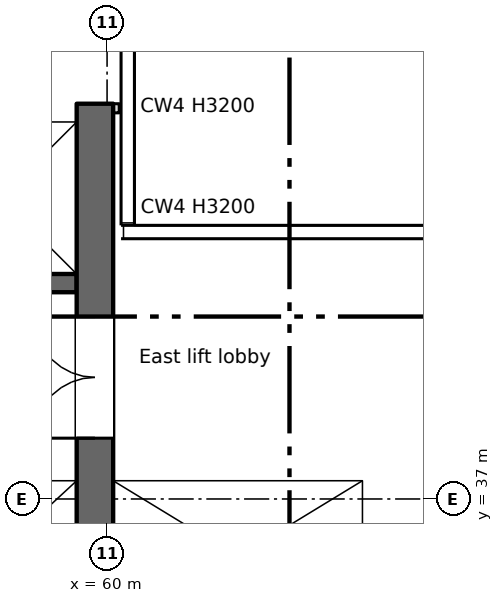
"""IFC4 building model, lengths in metres.
Left out: names, types, materials, properties, quantities, classifications, styles, units other than length and angle.
Written with IfcOpenShell. Run it as: python <this file> out.ifc"""

import sys

from ifc_helpers import new_model, si_unit, direction, frame, frame_2d, origin, place, context, subcontext, project, spatial, rectangle, extrude, element, fill, save


model = new_model("IFC4")
c1 = context("Model", 3, precision=1e-05, world=origin(), true_north=direction((0.0, 1.0)))
c2 = subcontext(c1, "Body", "Model", "MODEL_VIEW")
j1 = project(units=[si_unit("LENGTHUNIT", "METRE"), si_unit("PLANEANGLEUNIT", "RADIAN")], contexts=[c1])
p1 = place(None, origin())
s1 = spatial("IfcSite", under=j1, at=p1, CompositionType="ELEMENT")
p2 = place(p1, origin())
s2 = spatial("IfcBuilding", under=s1, at=p2, CompositionType="ELEMENT")
p3 = place(p2, frame((0.0, 0.0, 262.15)))
s3 = spatial("IfcBuildingStorey", under=s2, at=p3, CompositionType="ELEMENT", Elevation=262.15)
p4 = place(p3, frame((64.35, 34.8, 0.0), z_axis=(0.0, 0.0, 1.0), x_axis=(0.0, 1.0, 0.0)))
e1 = element("IfcWall", 1, at=p4, inside=s3, PredefinedType="SHEAR", context=c2, shape_type="SweptSolid", body=[
    extrude(rectangle(XDim=6.45, YDim=0.3, at=frame_2d((3.225, 0.0))), origin(), (0.0, 0.0, 1.0), 3.2),
])
p5 = place(p3, frame((59.8, 28.4, 0.0), z_axis=(0.0, 0.0, 1.0), x_axis=(0.0, 1.0, 0.0)))
e2 = element("IfcWall", 2, at=p5, inside=s3, PredefinedType="SHEAR", context=c2, shape_type="SweptSolid", body=[
    extrude(rectangle(XDim=15.1, YDim=0.6, at=frame_2d((7.55, 0.0))), origin(), (0.0, 0.0, 1.0), 3.2),
])
p6 = place(p5, frame((9.6, 0.0, 0.0)))
e3 = element("IfcOpeningElement", 3, at=p6, cuts=e2, PredefinedType="OPENING", context=c2, shape_type="SweptSolid", body=[
    extrude(rectangle(XDim=2.0, YDim=2.1, at=frame_2d((1.0, 1.05))), frame((0.0, 0.31, 0.0), z_axis=(0.0, -1.0, 0.0), x_axis=(1.0, 0.0, 0.0)), (0.0, 0.0, 1.0), 0.62),
])
p7 = place(p3, frame((47.3, 37.45, 0.0), z_axis=(0.0, 0.0, 1.0), x_axis=(1.0, 0.0, 0.0)))
e4 = element("IfcWall", 4, at=p7, inside=s3, PredefinedType="SHEAR", context=c2, shape_type="SweptSolid", body=[
    extrude(rectangle(XDim=12.2, YDim=0.3, at=frame_2d((6.1, 0.0))), origin(), (0.0, 0.0, 1.0), 3.2),
])
p8 = place(p7, frame((4.3, 0.0, 0.0)))
e5 = element("IfcOpeningElement", 5, at=p8, cuts=e4, PredefinedType="OPENING", context=c2, shape_type="SweptSolid", body=[
    extrude(rectangle(XDim=1.1, YDim=2.1, at=frame_2d((0.55, 1.05))), frame((0.0, 0.16, 0.0), z_axis=(0.0, -1.0, 0.0), x_axis=(1.0, 0.0, 0.0)), (0.0, 0.0, 1.0), 0.32),
])
p9 = place(p7, frame((7.3, 0.0, 0.0)))
e6 = element("IfcOpeningElement", 6, at=p9, cuts=e4, PredefinedType="OPENING", context=c2, shape_type="SweptSolid", body=[
    extrude(rectangle(XDim=1.1, YDim=2.1, at=frame_2d((0.55, 1.05))), frame((0.0, 0.16, 0.0), z_axis=(0.0, -1.0, 0.0), x_axis=(1.0, 0.0, 0.0)), (0.0, 0.0, 1.0), 0.32),
])
p10 = place(p7, frame((10.3, 0.0, 0.0)))
e7 = element("IfcOpeningElement", 7, at=p10, cuts=e4, PredefinedType="OPENING", context=c2, shape_type="SweptSolid", body=[
    extrude(rectangle(XDim=1.1, YDim=2.1, at=frame_2d((0.55, 1.05))), frame((0.0, 0.16, 0.0), z_axis=(0.0, -1.0, 0.0), x_axis=(1.0, 0.0, 0.0)), (0.0, 0.0, 1.0), 0.32),
])
p11 = place(p3, frame((60.1, 37.45, 0.0), z_axis=(0.0, 0.0, 1.0), x_axis=(1.0, 0.0, 0.0)))
e8 = element("IfcWall", 8, at=p11, inside=s3, PredefinedType="SHEAR", context=c2, shape_type="SweptSolid", body=[
    extrude(rectangle(XDim=4.1, YDim=0.3, at=frame_2d((2.05, 0.0))), origin(), (0.0, 0.0, 1.0), 3.2),
])
p12 = place(p11, frame((1.5, 0.0, 0.0)))
e9 = element("IfcOpeningElement", 9, at=p12, cuts=e8, PredefinedType="OPENING", context=c2, shape_type="SweptSolid", body=[
    extrude(rectangle(XDim=1.1, YDim=2.1, at=frame_2d((0.55, 1.05))), frame((0.0, 0.16, 0.0), z_axis=(0.0, -1.0, 0.0), x_axis=(1.0, 0.0, 0.0)), (0.0, 0.0, 1.0), 0.32),
])
p13 = place(p3, frame((18.5, 40.55, 0.0), z_axis=(0.0, 0.0, 1.0), x_axis=(1.0, 0.0, 0.0)))
e10 = element("IfcWall", 10, at=p13, inside=s3, PredefinedType="SHEAR", context=c2, shape_type="SweptSolid", body=[
    extrude(rectangle(XDim=41.0, YDim=0.3, at=frame_2d((20.5, 0.0))), origin(), (0.0, 0.0, 1.0), 3.2),
])
p14 = place(p13, frame((2.15, 0.0, 0.0)))
e11 = element("IfcOpeningElement", 11, at=p14, cuts=e10, PredefinedType="OPENING", context=c2, shape_type="SweptSolid", body=[
    extrude(rectangle(XDim=0.9, YDim=2.1, at=frame_2d((0.45, 1.05))), frame((0.0, 0.16, 0.0), z_axis=(0.0, -1.0, 0.0), x_axis=(1.0, 0.0, 0.0)), (0.0, 0.0, 1.0), 0.32),
])
p15 = place(p13, frame((15.9, 0.0, 0.0)))
e12 = element("IfcOpeningElement", 12, at=p15, cuts=e10, PredefinedType="OPENING", context=c2, shape_type="SweptSolid", body=[
    extrude(rectangle(XDim=0.9, YDim=2.1, at=frame_2d((0.45, 1.05))), frame((0.0, 0.16, 0.0), z_axis=(0.0, -1.0, 0.0), x_axis=(1.0, 0.0, 0.0)), (0.0, 0.0, 1.0), 0.32),
])
p16 = place(p13, frame((21.4, 0.0, 0.0)))
e13 = element("IfcOpeningElement", 13, at=p16, cuts=e10, PredefinedType="OPENING", context=c2, shape_type="SweptSolid", body=[
    extrude(rectangle(XDim=0.9, YDim=2.1, at=frame_2d((0.45, 1.05))), frame((0.0, 0.16, 0.0), z_axis=(0.0, -1.0, 0.0), x_axis=(1.0, 0.0, 0.0)), (0.0, 0.0, 1.0), 0.32),
])
p17 = place(p13, frame((26.9, 0.0, 0.0)))
e14 = element("IfcOpeningElement", 14, at=p17, cuts=e10, PredefinedType="OPENING", context=c2, shape_type="SweptSolid", body=[
    extrude(rectangle(XDim=0.9, YDim=2.1, at=frame_2d((0.45, 1.05))), frame((0.0, 0.16, 0.0), z_axis=(0.0, -1.0, 0.0), x_axis=(1.0, 0.0, 0.0)), (0.0, 0.0, 1.0), 0.32),
])
p18 = place(p13, frame((6.175, 0.0, 0.0)))
e15 = element("IfcOpeningElement", 15, at=p18, cuts=e10, PredefinedType="OPENING", context=c2, shape_type="SweptSolid", body=[
    extrude(rectangle(XDim=1.1, YDim=2.1, at=frame_2d((0.55, 1.05))), frame((0.0, 0.16, 0.0), z_axis=(0.0, -1.0, 0.0), x_axis=(1.0, 0.0, 0.0)), (0.0, 0.0, 1.0), 0.32),
])
p19 = place(p13, frame((8.925, 0.0, 0.0)))
e16 = element("IfcOpeningElement", 16, at=p19, cuts=e10, PredefinedType="OPENING", context=c2, shape_type="SweptSolid", body=[
    extrude(rectangle(XDim=1.1, YDim=2.1, at=frame_2d((0.55, 1.05))), frame((0.0, 0.16, 0.0), z_axis=(0.0, -1.0, 0.0), x_axis=(1.0, 0.0, 0.0)), (0.0, 0.0, 1.0), 0.32),
])
p20 = place(p13, frame((11.675, 0.0, 0.0)))
e17 = element("IfcOpeningElement", 17, at=p20, cuts=e10, PredefinedType="OPENING", context=c2, shape_type="SweptSolid", body=[
    extrude(rectangle(XDim=1.1, YDim=2.1, at=frame_2d((0.55, 1.05))), frame((0.0, 0.16, 0.0), z_axis=(0.0, -1.0, 0.0), x_axis=(1.0, 0.0, 0.0)), (0.0, 0.0, 1.0), 0.32),
])
p21 = place(p13, frame((30.925, 0.0, 0.0)))
e18 = element("IfcOpeningElement", 18, at=p21, cuts=e10, PredefinedType="OPENING", context=c2, shape_type="SweptSolid", body=[
    extrude(rectangle(XDim=1.1, YDim=2.1, at=frame_2d((0.55, 1.05))), frame((0.0, 0.16, 0.0), z_axis=(0.0, -1.0, 0.0), x_axis=(1.0, 0.0, 0.0)), (0.0, 0.0, 1.0), 0.32),
])
p22 = place(p13, frame((33.675, 0.0, 0.0)))
e19 = element("IfcOpeningElement", 19, at=p22, cuts=e10, PredefinedType="OPENING", context=c2, shape_type="SweptSolid", body=[
    extrude(rectangle(XDim=1.1, YDim=2.1, at=frame_2d((0.55, 1.05))), frame((0.0, 0.16, 0.0), z_axis=(0.0, -1.0, 0.0), x_axis=(1.0, 0.0, 0.0)), (0.0, 0.0, 1.0), 0.32),
])
p23 = place(p13, frame((36.375, 0.0, 0.0)))
e20 = element("IfcOpeningElement", 20, at=p23, cuts=e10, PredefinedType="OPENING", context=c2, shape_type="SweptSolid", body=[
    extrude(rectangle(XDim=1.2, YDim=2.1, at=frame_2d((0.6, 1.05))), frame((0.0, 0.16, 0.0), z_axis=(0.0, -1.0, 0.0), x_axis=(1.0, 0.0, 0.0)), (0.0, 0.0, 1.0), 0.32),
])
p24 = place(p13, frame((39.15, 0.0, 0.0)))
e21 = element("IfcOpeningElement", 21, at=p24, cuts=e10, PredefinedType="OPENING", context=c2, shape_type="SweptSolid", body=[
    extrude(rectangle(XDim=1.2, YDim=2.1, at=frame_2d((0.6, 1.05))), frame((0.0, 0.16, 0.0), z_axis=(0.0, -1.0, 0.0), x_axis=(1.0, 0.0, 0.0)), (0.0, 0.0, 1.0), 0.32),
])
p25 = place(p3, frame((18.5, 43.35, 0.0), z_axis=(0.0, 0.0, 1.0), x_axis=(1.0, 0.0, 0.0)))
e22 = element("IfcWall", 22, at=p25, inside=s3, PredefinedType="SHEAR", context=c2, shape_type="SweptSolid", body=[
    extrude(rectangle(XDim=41.0, YDim=0.3, at=frame_2d((20.5, 0.0))), origin(), (0.0, 0.0, 1.0), 3.2),
])
p26 = place(p3, frame((60.15, 43.35, 0.0), z_axis=(0.0, 0.0, 1.0), x_axis=(0.0, 1.0, 0.0)))
e23 = element("IfcWall", 23, at=p26, inside=s3, PredefinedType="PARTITIONING", context=c2, shape_type="SweptSolid", body=[
    extrude(rectangle(XDim=0.15, YDim=0.1, at=frame_2d((0.075, 0.0))), origin(), (0.0, 0.0, 1.0), 3.2),
])
p27 = place(p12, origin())
e24 = element("IfcDoor", 24, at=p27, inside=s3, OperationType="SLIDING_TO_LEFT", PredefinedType="DOOR", context=c2, shape_type="SweptSolid", body=[
    extrude(rectangle(XDim=1.1, YDim=2.1, at=frame_2d((0.55, 1.05))), frame((0.0, 0.025, 0.0), z_axis=(0.0, -1.0, 0.0), x_axis=(1.0, 0.0, 0.0)), (0.0, 0.0, 1.0), 0.05),
])
fill(e9, e24)
p28 = place(p6, origin())
e25 = element("IfcDoor", 25, at=p28, inside=s3, OperationType="DOUBLE_DOOR_SINGLE_SWING", PredefinedType="DOOR", context=c2, shape_type="SweptSolid", body=[
    extrude(rectangle(XDim=2.0, YDim=2.1, at=frame_2d((1.0, 1.05))), frame((0.0, 0.025, 0.0), z_axis=(0.0, -1.0, 0.0), x_axis=(1.0, 0.0, 0.0)), (0.0, 0.0, 1.0), 0.05),
])
fill(e3, e25)
save(model, sys.argv[1])
